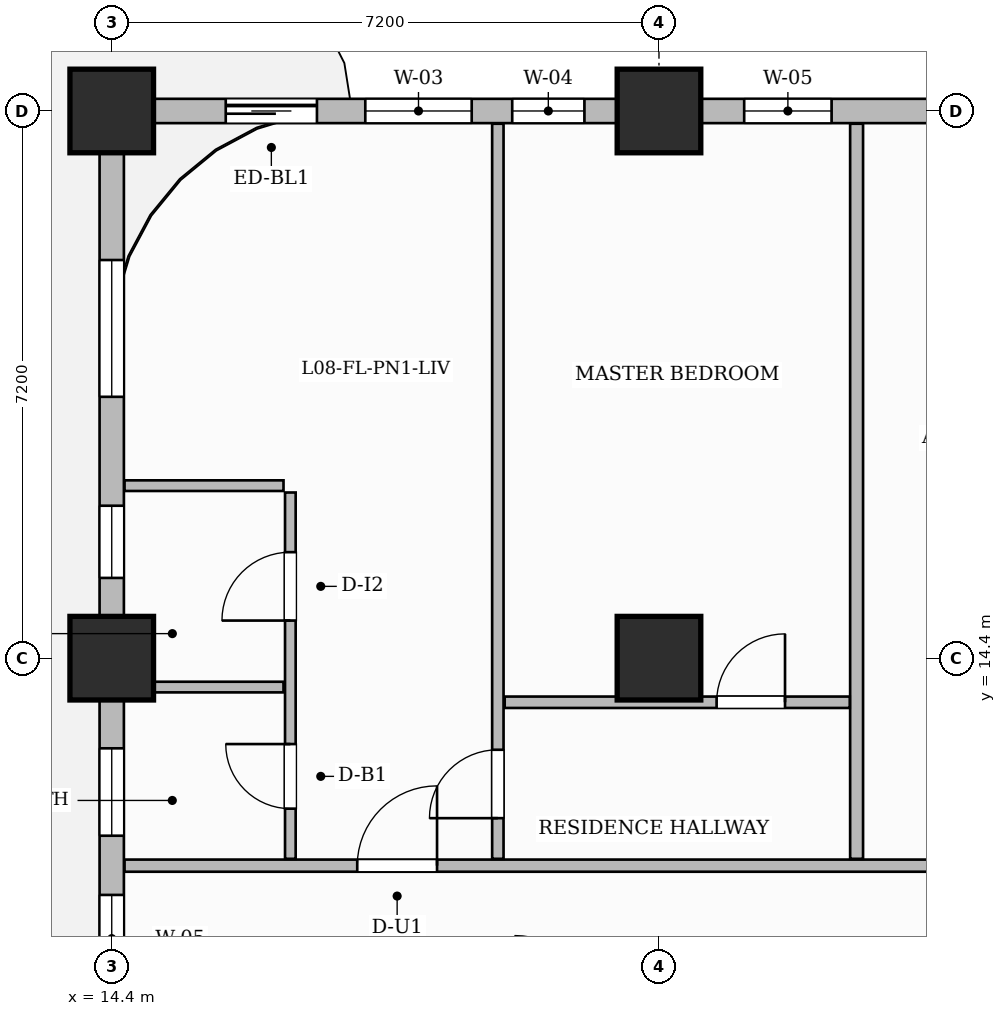
"""IFC4 building model, lengths in metres.
Left out: names, types, materials, properties, quantities, classifications, styles, units other than length and angle.
Written with IfcOpenShell. Run it as: python <this file> out.ifc"""

import sys

from ifc_helpers import new_model, si_unit, direction, frame, frame_2d, origin, origin_2d, place, context, subcontext, project, spatial, rectangle, extrude, source, transform, mapped, element, fill, save


model = new_model("IFC4")
c1 = context("Model", 3, precision=1e-05, world=origin(), true_north=direction((0.0, 1.0)))
c2 = subcontext(c1, "Body", "Model", "MODEL_VIEW")
j1 = project(units=[si_unit("LENGTHUNIT", "METRE"), si_unit("PLANEANGLEUNIT", "RADIAN")], contexts=[c1])
p1 = place(None, origin())
s1 = spatial("IfcSite", under=j1, at=p1, CompositionType="ELEMENT")
p2 = place(p1, origin())
s2 = spatial("IfcBuilding", under=s1, at=p2, CompositionType="ELEMENT")
p3 = place(p2, frame((0.0, 0.0, 39.8)))
s3 = spatial("IfcBuildingStorey", under=s2, at=p3, CompositionType="ELEMENT", Elevation=39.8)
m1 = source(origin(), c2, "Body", "SweptSolid", [
    extrude(rectangle(XDim=1.1, YDim=1.1, at=origin_2d()), origin(), (0.0, 0.0, 1.0), 3.7),
])
for number, where, z_axis, x_axis in (
    (1, (14.4, 14.4, 0.0), (0.0, 0.0, 1.0), (1.0, 0.0, 0.0)),
    (2, (14.4, 21.6, 0.0), (0.0, 0.0, 1.0), (1.0, 0.0, 0.0)),
    (3, (21.6, 14.4, 0.0), (0.0, 0.0, 1.0), (1.0, 0.0, 0.0)),
    (4, (21.6, 21.6, 0.0), (0.0, 0.0, 1.0), (1.0, 0.0, 0.0)),
):
    element("IfcColumn", number, at=place(p3, frame(where, z_axis=z_axis, x_axis=x_axis)), inside=s3, PredefinedType="COLUMN", context=c2, shape_type="MappedRepresentation", body=[
        mapped(m1, transform((0.0, 0.0, 0.0), scale=1.0)),
    ])
p4 = place(p3, frame((14.568, 11.67, 0.0), z_axis=(0.0, 0.0, 1.0), x_axis=(1.0, 0.0, 0.0)))
e5 = element("IfcWall", 5, at=p4, inside=s3, PredefinedType="PARTITIONING", context=c2, shape_type="SweptSolid", body=[
    extrude(rectangle(XDim=15.542, YDim=0.16, at=frame_2d((7.771, 0.0))), origin(), (0.0, 0.0, 1.0), 3.45),
])
p5 = place(p4, frame((3.062, 0.0, 0.0)))
e6 = element("IfcOpeningElement", 6, at=p5, cuts=e5, PredefinedType="OPENING", context=c2, shape_type="SweptSolid", body=[
    extrude(rectangle(XDim=1.05, YDim=2.25, at=frame_2d((0.525, 1.125))), frame((0.0, 0.09, 0.0), z_axis=(0.0, -1.0, 0.0), x_axis=(1.0, 0.0, 0.0)), (0.0, 0.0, 1.0), 0.18),
])
p6 = place(p4, frame((11.932, 0.0, 0.0)))
e7 = element("IfcOpeningElement", 7, at=p6, cuts=e5, PredefinedType="OPENING", context=c2, shape_type="SweptSolid", body=[
    extrude(rectangle(XDim=1.4, YDim=2.35, at=frame_2d((0.7, 1.175))), frame((0.0, 0.09, 0.0), z_axis=(0.0, -1.0, 0.0), x_axis=(1.0, 0.0, 0.0)), (0.0, 0.0, 1.0), 0.18),
])
p7 = place(p3, frame((24.2, 11.76, 0.0), z_axis=(0.0, 0.0, 1.0), x_axis=(0.0, 1.0, 0.0)))
e8 = element("IfcWall", 8, at=p7, inside=s3, PredefinedType="PARTITIONING", context=c2, shape_type="SweptSolid", body=[
    extrude(rectangle(XDim=9.672, YDim=0.17, at=frame_2d((4.836, 0.0))), origin(), (0.0, 0.0, 1.0), 3.45),
])
p8 = place(p3, frame((16.75, 11.76, 0.0), z_axis=(0.0, 0.0, 1.0), x_axis=(0.0, 1.0, 0.0)))
e9 = element("IfcWall", 9, at=p8, inside=s3, PredefinedType="PARTITIONING", context=c2, shape_type="SweptSolid", body=[
    extrude(rectangle(XDim=4.82, YDim=0.14, at=frame_2d((2.41, 0.0))), origin(), (0.0, 0.0, 1.0), 3.45),
])
p9 = place(p8, frame((0.66, 0.0, 0.0)))
e10 = element("IfcOpeningElement", 10, at=p9, cuts=e9, PredefinedType="OPENING", context=c2, shape_type="SweptSolid", body=[
    extrude(rectangle(XDim=0.85, YDim=2.1, at=frame_2d((0.425, 1.05))), frame((0.0, 0.08, 0.0), z_axis=(0.0, -1.0, 0.0), x_axis=(1.0, 0.0, 0.0)), (0.0, 0.0, 1.0), 0.16),
])
p10 = place(p8, frame((3.135, 0.0, 0.0)))
e11 = element("IfcOpeningElement", 11, at=p10, cuts=e9, PredefinedType="OPENING", context=c2, shape_type="SweptSolid", body=[
    extrude(rectangle(XDim=0.9, YDim=2.15, at=frame_2d((0.45, 1.075))), frame((0.0, 0.08, 0.0), z_axis=(0.0, -1.0, 0.0), x_axis=(1.0, 0.0, 0.0)), (0.0, 0.0, 1.0), 0.16),
])
p11 = place(p3, frame((14.59, 14.02, 0.0), z_axis=(0.0, 0.0, 1.0), x_axis=(1.0, 0.0, 0.0)))
e12 = element("IfcWall", 12, at=p11, inside=s3, PredefinedType="PARTITIONING", context=c2, shape_type="SweptSolid", body=[
    extrude(rectangle(XDim=2.07, YDim=0.14, at=frame_2d((1.035, 0.0))), origin(), (0.0, 0.0, 1.0), 3.45),
])
p12 = place(p3, frame((14.568, 16.67, 0.0), z_axis=(0.0, 0.0, 1.0), x_axis=(1.0, 0.0, 0.0)))
e13 = element("IfcWall", 13, at=p12, inside=s3, PredefinedType="PARTITIONING", context=c2, shape_type="SweptSolid", body=[
    extrude(rectangle(XDim=2.092, YDim=0.14, at=frame_2d((1.046, 0.0))), origin(), (0.0, 0.0, 1.0), 3.45),
])
p13 = place(p3, frame((19.48, 11.76, 0.0), z_axis=(0.0, 0.0, 1.0), x_axis=(0.0, 1.0, 0.0)))
e14 = element("IfcWall", 14, at=p13, inside=s3, PredefinedType="PARTITIONING", context=c2, shape_type="SweptSolid", body=[
    extrude(rectangle(XDim=9.672, YDim=0.15, at=frame_2d((4.836, 0.0))), origin(), (0.0, 0.0, 1.0), 3.45),
])
p14 = place(p13, frame((0.535, 0.0, 0.0)))
e15 = element("IfcOpeningElement", 15, at=p14, cuts=e14, PredefinedType="OPENING", context=c2, shape_type="SweptSolid", body=[
    extrude(rectangle(XDim=0.9, YDim=2.15, at=frame_2d((0.45, 1.075))), frame((0.0, 0.085, 0.0), z_axis=(0.0, -1.0, 0.0), x_axis=(1.0, 0.0, 0.0)), (0.0, 0.0, 1.0), 0.17),
])
p15 = place(p3, frame((19.57, 13.82, 0.0), z_axis=(0.0, 0.0, 1.0), x_axis=(1.0, 0.0, 0.0)))
e16 = element("IfcWall", 16, at=p15, inside=s3, PredefinedType="PARTITIONING", context=c2, shape_type="SweptSolid", body=[
    extrude(rectangle(XDim=4.54, YDim=0.15, at=frame_2d((2.27, 0.0))), origin(), (0.0, 0.0, 1.0), 3.45),
])
p16 = place(p15, frame((2.788, 0.0, 0.0)))
e17 = element("IfcOpeningElement", 17, at=p16, cuts=e16, PredefinedType="OPENING", context=c2, shape_type="SweptSolid", body=[
    extrude(rectangle(XDim=0.9, YDim=2.15, at=frame_2d((0.45, 1.075))), frame((0.0, 0.085, 0.0), z_axis=(0.0, -1.0, 0.0), x_axis=(1.0, 0.0, 0.0)), (0.0, 0.0, 1.0), 0.17),
])
p17 = place(p3, frame((14.4, 21.6, 0.0), z_axis=(0.0, 0.0, 1.0), x_axis=(1.0, 0.0, 0.0)))
e18 = element("IfcWall", 18, at=p17, inside=s3, PredefinedType="SOLIDWALL", context=c2, shape_type="SweptSolid", body=[
    extrude(rectangle(XDim=43.2, YDim=0.32, at=frame_2d((21.6, 0.0))), origin(), (0.0, 0.0, 1.0), 2.885),
])
p18 = place(p17, frame((1.5, 0.0, 0.0)))
e19 = element("IfcOpeningElement", 19, at=p18, cuts=e18, PredefinedType="OPENING", context=c2, shape_type="SweptSolid", body=[
    extrude(rectangle(XDim=1.2, YDim=2.2, at=frame_2d((0.6, 1.1))), frame((0.0, 0.17, 0.0), z_axis=(0.0, -1.0, 0.0), x_axis=(1.0, 0.0, 0.0)), (0.0, 0.0, 1.0), 0.34),
])
p19 = place(p17, frame((3.336, 0.0, 0.8)))
e20 = element("IfcOpeningElement", 20, at=p19, cuts=e18, PredefinedType="OPENING", context=c2, shape_type="SweptSolid", body=[
    extrude(rectangle(XDim=1.4, YDim=1.85, at=frame_2d((0.7, 0.925))), frame((0.0, 0.17, 0.0), z_axis=(0.0, -1.0, 0.0), x_axis=(1.0, 0.0, 0.0)), (0.0, 0.0, 1.0), 0.34),
])
p20 = place(p17, frame((5.269, 0.0, 0.8)))
e21 = element("IfcOpeningElement", 21, at=p20, cuts=e18, PredefinedType="OPENING", context=c2, shape_type="SweptSolid", body=[
    extrude(rectangle(XDim=0.95, YDim=1.75, at=frame_2d((0.475, 0.875))), frame((0.0, 0.17, 0.0), z_axis=(0.0, -1.0, 0.0), x_axis=(1.0, 0.0, 0.0)), (0.0, 0.0, 1.0), 0.34),
])
p21 = place(p17, frame((8.321, 0.0, 0.8)))
e22 = element("IfcOpeningElement", 22, at=p21, cuts=e18, PredefinedType="OPENING", context=c2, shape_type="SweptSolid", body=[
    extrude(rectangle(XDim=1.15, YDim=1.8, at=frame_2d((0.575, 0.9))), frame((0.0, 0.17, 0.0), z_axis=(0.0, -1.0, 0.0), x_axis=(1.0, 0.0, 0.0)), (0.0, 0.0, 1.0), 0.34),
])
p22 = place(p17, frame((10.804, 0.0, 0.8)))
e23 = element("IfcOpeningElement", 23, at=p22, cuts=e18, PredefinedType="OPENING", context=c2, shape_type="SweptSolid", body=[
    extrude(rectangle(XDim=1.8, YDim=1.85, at=frame_2d((0.9, 0.925))), frame((0.0, 0.17, 0.0), z_axis=(0.0, -1.0, 0.0), x_axis=(1.0, 0.0, 0.0)), (0.0, 0.0, 1.0), 0.34),
])
p23 = place(p17, frame((16.601, 0.0, 0.8)))
e24 = element("IfcOpeningElement", 24, at=p23, cuts=e18, PredefinedType="OPENING", context=c2, shape_type="SweptSolid", body=[
    extrude(rectangle(XDim=1.8, YDim=1.85, at=frame_2d((0.9, 0.925))), frame((0.0, 0.17, 0.0), z_axis=(0.0, -1.0, 0.0), x_axis=(1.0, 0.0, 0.0)), (0.0, 0.0, 1.0), 0.34),
])
p24 = place(p17, frame((21.723, 0.0, 0.8)))
e25 = element("IfcOpeningElement", 25, at=p24, cuts=e18, PredefinedType="OPENING", context=c2, shape_type="SweptSolid", body=[
    extrude(rectangle(XDim=1.8, YDim=1.85, at=frame_2d((0.9, 0.925))), frame((0.0, 0.17, 0.0), z_axis=(0.0, -1.0, 0.0), x_axis=(1.0, 0.0, 0.0)), (0.0, 0.0, 1.0), 0.34),
])
p25 = place(p17, frame((24.469, 0.0, 0.8)))
e26 = element("IfcOpeningElement", 26, at=p25, cuts=e18, PredefinedType="OPENING", context=c2, shape_type="SweptSolid", body=[
    extrude(rectangle(XDim=1.8, YDim=1.85, at=frame_2d((0.9, 0.925))), frame((0.0, 0.17, 0.0), z_axis=(0.0, -1.0, 0.0), x_axis=(1.0, 0.0, 0.0)), (0.0, 0.0, 1.0), 0.34),
])
p26 = place(p17, frame((29.075, 0.0, 0.8)))
e27 = element("IfcOpeningElement", 27, at=p26, cuts=e18, PredefinedType="OPENING", context=c2, shape_type="SweptSolid", body=[
    extrude(rectangle(XDim=1.8, YDim=1.85, at=frame_2d((0.9, 0.925))), frame((0.0, 0.17, 0.0), z_axis=(0.0, -1.0, 0.0), x_axis=(1.0, 0.0, 0.0)), (0.0, 0.0, 1.0), 0.34),
])
p27 = place(p17, frame((32.125, 0.0, 0.8)))
e28 = element("IfcOpeningElement", 28, at=p27, cuts=e18, PredefinedType="OPENING", context=c2, shape_type="SweptSolid", body=[
    extrude(rectangle(XDim=1.8, YDim=1.85, at=frame_2d((0.9, 0.925))), frame((0.0, 0.17, 0.0), z_axis=(0.0, -1.0, 0.0), x_axis=(1.0, 0.0, 0.0)), (0.0, 0.0, 1.0), 0.34),
])
p28 = place(p17, frame((36.875, 0.0, 0.8)))
e29 = element("IfcOpeningElement", 29, at=p28, cuts=e18, PredefinedType="OPENING", context=c2, shape_type="SweptSolid", body=[
    extrude(rectangle(XDim=1.8, YDim=1.85, at=frame_2d((0.9, 0.925))), frame((0.0, 0.17, 0.0), z_axis=(0.0, -1.0, 0.0), x_axis=(1.0, 0.0, 0.0)), (0.0, 0.0, 1.0), 0.34),
])
p29 = place(p17, frame((39.925, 0.0, 0.8)))
e30 = element("IfcOpeningElement", 30, at=p29, cuts=e18, PredefinedType="OPENING", context=c2, shape_type="SweptSolid", body=[
    extrude(rectangle(XDim=1.8, YDim=1.85, at=frame_2d((0.9, 0.925))), frame((0.0, 0.17, 0.0), z_axis=(0.0, -1.0, 0.0), x_axis=(1.0, 0.0, 0.0)), (0.0, 0.0, 1.0), 0.34),
])
p30 = place(p3, frame((14.4, 0.05, 0.0), z_axis=(0.0, 0.0, 1.0), x_axis=(0.0, 1.0, 0.0)))
e31 = element("IfcWall", 31, at=p30, inside=s3, PredefinedType="SOLIDWALL", context=c2, shape_type="SweptSolid", body=[
    extrude(rectangle(XDim=21.5, YDim=0.32, at=frame_2d((10.75, 0.0))), origin(), (0.0, 0.0, 1.0), 2.885),
])
p31 = place(p30, frame((1.275, 0.0, 0.8)))
e32 = element("IfcOpeningElement", 32, at=p31, cuts=e31, PredefinedType="OPENING", context=c2, shape_type="SweptSolid", body=[
    extrude(rectangle(XDim=1.8, YDim=1.85, at=frame_2d((0.9, 0.925))), frame((0.0, 0.17, 0.0), z_axis=(0.0, -1.0, 0.0), x_axis=(1.0, 0.0, 0.0)), (0.0, 0.0, 1.0), 0.34),
])
p32 = place(p30, frame((4.025, 0.0, 0.8)))
e33 = element("IfcOpeningElement", 33, at=p32, cuts=e31, PredefinedType="OPENING", context=c2, shape_type="SweptSolid", body=[
    extrude(rectangle(XDim=1.8, YDim=1.85, at=frame_2d((0.9, 0.925))), frame((0.0, 0.17, 0.0), z_axis=(0.0, -1.0, 0.0), x_axis=(1.0, 0.0, 0.0)), (0.0, 0.0, 1.0), 0.34),
])
p33 = place(p30, frame((8.246, 0.0, 0.8)))
e34 = element("IfcOpeningElement", 34, at=p33, cuts=e31, PredefinedType="OPENING", context=c2, shape_type="SweptSolid", body=[
    extrude(rectangle(XDim=1.15, YDim=1.8, at=frame_2d((0.575, 0.9))), frame((0.0, 0.17, 0.0), z_axis=(0.0, -1.0, 0.0), x_axis=(1.0, 0.0, 0.0)), (0.0, 0.0, 1.0), 0.34),
])
p34 = place(p30, frame((10.085, 0.0, 0.8)))
e35 = element("IfcOpeningElement", 35, at=p34, cuts=e31, PredefinedType="OPENING", context=c2, shape_type="SweptSolid", body=[
    extrude(rectangle(XDim=1.15, YDim=1.8, at=frame_2d((0.575, 0.9))), frame((0.0, 0.17, 0.0), z_axis=(0.0, -1.0, 0.0), x_axis=(1.0, 0.0, 0.0)), (0.0, 0.0, 1.0), 0.34),
])
p35 = place(p30, frame((12.014, 0.0, 0.8)))
e36 = element("IfcOpeningElement", 36, at=p35, cuts=e31, PredefinedType="OPENING", context=c2, shape_type="SweptSolid", body=[
    extrude(rectangle(XDim=1.15, YDim=1.8, at=frame_2d((0.575, 0.9))), frame((0.0, 0.17, 0.0), z_axis=(0.0, -1.0, 0.0), x_axis=(1.0, 0.0, 0.0)), (0.0, 0.0, 1.0), 0.34),
])
p36 = place(p30, frame((15.406, 0.0, 0.8)))
e37 = element("IfcOpeningElement", 37, at=p36, cuts=e31, PredefinedType="OPENING", context=c2, shape_type="SweptSolid", body=[
    extrude(rectangle(XDim=0.95, YDim=1.75, at=frame_2d((0.475, 0.875))), frame((0.0, 0.17, 0.0), z_axis=(0.0, -1.0, 0.0), x_axis=(1.0, 0.0, 0.0)), (0.0, 0.0, 1.0), 0.34),
])
p37 = place(p30, frame((17.789, 0.0, 0.8)))
e38 = element("IfcOpeningElement", 38, at=p37, cuts=e31, PredefinedType="OPENING", context=c2, shape_type="SweptSolid", body=[
    extrude(rectangle(XDim=1.8, YDim=1.85, at=frame_2d((0.9, 0.925))), frame((0.0, 0.17, 0.0), z_axis=(0.0, -1.0, 0.0), x_axis=(1.0, 0.0, 0.0)), (0.0, 0.0, 1.0), 0.34),
])
m2 = source(origin(), c2, "Body", "SweptSolid", [
    extrude(rectangle(XDim=0.85, YDim=2.1, at=frame_2d((0.425, 1.05))), frame((0.0, 0.025, 0.0), z_axis=(0.0, -1.0, 0.0), x_axis=(1.0, 0.0, 0.0)), (0.0, 0.0, 1.0), 0.05),
])
p38 = place(p9, origin())
e39 = element("IfcDoor", 39, at=p38, inside=s3, OperationType="SINGLE_SWING_RIGHT", PredefinedType="DOOR", context=c2, shape_type="MappedRepresentation", body=[
    mapped(m2, transform((0.0, 0.0, 0.0), scale=1.0)),
])
fill(e10, e39)
m3 = source(origin(), c2, "Body", "SweptSolid", [
    extrude(rectangle(XDim=0.9, YDim=2.15, at=frame_2d((0.45, 1.075))), frame((0.0, 0.025, 0.0), z_axis=(0.0, -1.0, 0.0), x_axis=(1.0, 0.0, 0.0)), (0.0, 0.0, 1.0), 0.05),
])
p39 = place(p10, origin())
e40 = element("IfcDoor", 40, at=p39, inside=s3, OperationType="SINGLE_SWING_LEFT", PredefinedType="DOOR", context=c2, shape_type="MappedRepresentation", body=[
    mapped(m3, transform((0.0, 0.0, 0.0), scale=1.0)),
])
fill(e11, e40)
m4 = source(origin(), c2, "Body", "SweptSolid", [
    extrude(rectangle(XDim=1.05, YDim=2.25, at=frame_2d((0.525, 1.125))), frame((0.0, 0.025, 0.0), z_axis=(0.0, -1.0, 0.0), x_axis=(1.0, 0.0, 0.0)), (0.0, 0.0, 1.0), 0.05),
])
p40 = place(p5, origin())
e41 = element("IfcDoor", 41, at=p40, inside=s3, OperationType="SINGLE_SWING_RIGHT", PredefinedType="DOOR", context=c2, shape_type="MappedRepresentation", body=[
    mapped(m4, transform((0.0, 0.0, 0.0), scale=1.0)),
])
fill(e6, e41)
p41 = place(p14, origin())
e42 = element("IfcDoor", 42, at=p41, inside=s3, OperationType="SINGLE_SWING_LEFT", PredefinedType="DOOR", context=c2, shape_type="MappedRepresentation", body=[
    mapped(m3, transform((0.0, 0.0, 0.0), scale=1.0)),
])
fill(e15, e42)
p42 = place(p16, origin())
e43 = element("IfcDoor", 43, at=p42, inside=s3, OperationType="SINGLE_SWING_RIGHT", PredefinedType="DOOR", context=c2, shape_type="MappedRepresentation", body=[
    mapped(m3, transform((0.0, 0.0, 0.0), scale=1.0)),
])
fill(e17, e43)
m5 = source(origin(), c2, "Body", "SweptSolid", [
    extrude(rectangle(XDim=1.2, YDim=2.2, at=frame_2d((0.6, 1.1))), frame((0.0, 0.025, 0.0), z_axis=(0.0, -1.0, 0.0), x_axis=(1.0, 0.0, 0.0)), (0.0, 0.0, 1.0), 0.05),
])
p43 = place(p18, origin())
e44 = element("IfcDoor", 44, at=p43, inside=s3, OperationType="SLIDING_TO_LEFT", PredefinedType="DOOR", context=c2, shape_type="MappedRepresentation", body=[
    mapped(m5, transform((0.0, 0.0, 0.0), scale=1.0)),
])
fill(e19, e44)
m6 = source(origin(), c2, "Body", "SweptSolid", [
    extrude(rectangle(XDim=1.4, YDim=1.85, at=frame_2d((0.7, 0.925))), frame((0.0, 0.03, 0.0), z_axis=(0.0, -1.0, 0.0), x_axis=(1.0, 0.0, 0.0)), (0.0, 0.0, 1.0), 0.06),
])
p44 = place(p19, origin())
e45 = element("IfcWindow", 45, at=p44, inside=s3, PartitioningType="SINGLE_PANEL", PredefinedType="WINDOW", context=c2, shape_type="MappedRepresentation", body=[
    mapped(m6, transform((0.0, 0.0, 0.0), scale=1.0)),
])
fill(e20, e45)
m7 = source(origin(), c2, "Body", "SweptSolid", [
    extrude(rectangle(XDim=0.95, YDim=1.75, at=frame_2d((0.475, 0.875))), frame((0.0, 0.03, 0.0), z_axis=(0.0, -1.0, 0.0), x_axis=(1.0, 0.0, 0.0)), (0.0, 0.0, 1.0), 0.06),
])
p45 = place(p20, origin())
e46 = element("IfcWindow", 46, at=p45, inside=s3, PartitioningType="SINGLE_PANEL", PredefinedType="WINDOW", context=c2, shape_type="MappedRepresentation", body=[
    mapped(m7, transform((0.0, 0.0, 0.0), scale=1.0)),
])
fill(e21, e46)
m8 = source(origin(), c2, "Body", "SweptSolid", [
    extrude(rectangle(XDim=1.15, YDim=1.8, at=frame_2d((0.575, 0.9))), frame((0.0, 0.03, 0.0), z_axis=(0.0, -1.0, 0.0), x_axis=(1.0, 0.0, 0.0)), (0.0, 0.0, 1.0), 0.06),
])
p46 = place(p21, origin())
e47 = element("IfcWindow", 47, at=p46, inside=s3, PartitioningType="SINGLE_PANEL", PredefinedType="WINDOW", context=c2, shape_type="MappedRepresentation", body=[
    mapped(m8, transform((0.0, 0.0, 0.0), scale=1.0)),
])
fill(e22, e47)
p47 = place(p34, origin())
e48 = element("IfcWindow", 48, at=p47, inside=s3, PartitioningType="SINGLE_PANEL", PredefinedType="WINDOW", context=c2, shape_type="MappedRepresentation", body=[
    mapped(m8, transform((0.0, 0.0, 0.0), scale=1.0)),
])
fill(e35, e48)
p48 = place(p35, origin())
e49 = element("IfcWindow", 49, at=p48, inside=s3, PartitioningType="SINGLE_PANEL", PredefinedType="WINDOW", context=c2, shape_type="MappedRepresentation", body=[
    mapped(m8, transform((0.0, 0.0, 0.0), scale=1.0)),
])
fill(e36, e49)
p49 = place(p36, origin())
e50 = element("IfcWindow", 50, at=p49, inside=s3, PartitioningType="SINGLE_PANEL", PredefinedType="WINDOW", context=c2, shape_type="MappedRepresentation", body=[
    mapped(m7, transform((0.0, 0.0, 0.0), scale=1.0)),
])
fill(e37, e50)
m9 = source(origin(), c2, "Body", "SweptSolid", [
    extrude(rectangle(XDim=1.8, YDim=1.85, at=frame_2d((0.9, 0.925))), frame((0.0, 0.03, 0.0), z_axis=(0.0, -1.0, 0.0), x_axis=(1.0, 0.0, 0.0)), (0.0, 0.0, 1.0), 0.06),
])
p50 = place(p37, origin())
e51 = element("IfcWindow", 51, at=p50, inside=s3, PartitioningType="DOUBLE_PANEL_VERTICAL", PredefinedType="WINDOW", context=c2, shape_type="MappedRepresentation", body=[
    mapped(m9, transform((0.0, 0.0, 0.0), scale=1.0)),
])
fill(e38, e51)
save(model, sys.argv[1])
